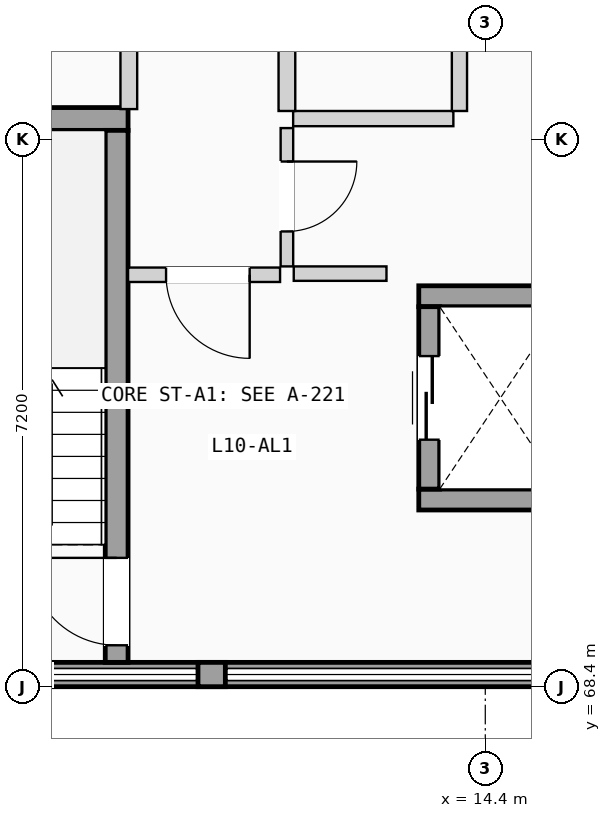
"""IFC4 building model, lengths in metres.
Left out: names, types, materials, properties, quantities, classifications, styles, units other than length and angle.
Written with IfcOpenShell. Run it as: python <this file> out.ifc"""

import sys

from ifc_helpers import new_model, si_unit, direction, frame, frame_2d, origin, place, context, subcontext, project, spatial, rectangle, extrude, element, fill, save


model = new_model("IFC4")
c1 = context("Model", 3, precision=1e-05, world=origin(), true_north=direction((0.0, 1.0)))
c2 = subcontext(c1, "Body", "Model", "MODEL_VIEW")
j1 = project(units=[si_unit("LENGTHUNIT", "METRE"), si_unit("PLANEANGLEUNIT", "RADIAN")], contexts=[c1])
p1 = place(None, origin())
s1 = spatial("IfcSite", under=j1, at=p1, CompositionType="ELEMENT")
p2 = place(p1, origin())
s2 = spatial("IfcBuilding", under=s1, at=p2, CompositionType="ELEMENT")
p3 = place(p2, frame((0.0, 0.0, 34.125)))
s3 = spatial("IfcBuildingStorey", under=s2, at=p3, CompositionType="ELEMENT", Elevation=34.125)
p4 = place(p3, frame((0.0, 68.56, 0.0), z_axis=(0.0, 0.0, 1.0), x_axis=(1.0, 0.0, 0.0)))
e1 = element("IfcWall", 1, at=p4, inside=s3, PredefinedType="SOLIDWALL", context=c2, shape_type="SweptSolid", body=[
    extrude(rectangle(XDim=21.6, YDim=0.32, at=frame_2d((10.8, 0.0))), origin(), (0.0, 0.0, 1.0), 1.11),
])
p5 = place(p3, frame((10.62, 68.56, 1.11), z_axis=(0.0, 0.0, 1.0), x_axis=(1.0, 0.0, 0.0)))
e2 = element("IfcWall", 2, at=p5, inside=s3, PredefinedType="SOLIDWALL", context=c2, shape_type="SweptSolid", body=[
    extrude(rectangle(XDim=0.36, YDim=0.32, at=frame_2d((0.18, 0.0))), origin(), (0.0, 0.0, 1.0), 1.78),
])
p6 = place(p3, frame((5.65, 75.87, 0.0), z_axis=(0.0, 0.0, 1.0), x_axis=(1.0, 0.0, 0.0)))
e3 = element("IfcWall", 3, at=p6, inside=s3, PredefinedType="SHEAR", context=c2, shape_type="SweptSolid", body=[
    extrude(rectangle(XDim=4.05, YDim=0.3, at=frame_2d((2.025, 0.0))), origin(), (0.0, 0.0, 1.0), 2.89),
])
p7 = place(p3, frame((9.55, 68.72, 0.0), z_axis=(0.0, 0.0, 1.0), x_axis=(0.0, 1.0, 0.0)))
e4 = element("IfcWall", 4, at=p7, inside=s3, PredefinedType="SHEAR", context=c2, shape_type="SweptSolid", body=[
    extrude(rectangle(XDim=7.0, YDim=0.3, at=frame_2d((3.5, 0.0))), origin(), (0.0, 0.0, 1.0), 2.89),
])
p8 = place(p7, frame((0.225, 0.0, 0.0)))
e5 = element("IfcOpeningElement", 5, at=p8, cuts=e4, PredefinedType="OPENING", context=c2, shape_type="SweptSolid", body=[
    extrude(rectangle(XDim=1.15, YDim=2.12, at=frame_2d((0.575, 1.06))), frame((0.0, 0.16, 0.0), z_axis=(0.0, -1.0, 0.0), x_axis=(1.0, 0.0, 0.0)), (0.0, 0.0, 1.0), 0.32),
])
for number, where, z_axis, x_axis in (
    (6, (13.525, 70.863, 0.0), (0.0, 0.0, 1.0), (1.0, 0.0, 0.0)),
    (7, (13.525, 73.538, 0.0), (0.0, 0.0, 1.0), (1.0, 0.0, 0.0)),
):
    element("IfcWall", number, at=place(p3, frame(where, z_axis=z_axis, x_axis=x_axis)), inside=s3, PredefinedType="SHEAR", context=c2, shape_type="SweptSolid", body=[
        extrude(rectangle(XDim=2.15, YDim=0.275, at=frame_2d((1.075, 0.0))), origin(), (0.0, 0.0, 1.0), 2.89),
    ])
p9 = place(p3, frame((13.663, 71.0, 0.0), z_axis=(0.0, 0.0, 1.0), x_axis=(0.0, 1.0, 0.0)))
e8 = element("IfcWall", 8, at=p9, inside=s3, PredefinedType="SHEAR", context=c2, shape_type="SweptSolid", body=[
    extrude(rectangle(XDim=2.4, YDim=0.275, at=frame_2d((1.2, 0.0))), origin(), (0.0, 0.0, 1.0), 2.89),
])
p10 = place(p9, frame((0.65, 0.0, 0.0)))
e9 = element("IfcOpeningElement", 9, at=p10, cuts=e8, PredefinedType="OPENING", context=c2, shape_type="SweptSolid", body=[
    extrude(rectangle(XDim=1.1, YDim=2.15, at=frame_2d((0.55, 1.075))), frame((0.0, 0.147, 0.0), z_axis=(0.0, -1.0, 0.0), x_axis=(1.0, 0.0, 0.0)), (0.0, 0.0, 1.0), 0.295),
])
p11 = place(p3, frame((11.88, 73.835, 0.0), z_axis=(0.0, 0.0, 1.0), x_axis=(1.0, 0.0, 0.0)))
e10 = element("IfcWall", 10, at=p11, inside=s3, PredefinedType="PARTITIONING", context=c2, shape_type="SweptSolid", body=[
    extrude(rectangle(XDim=1.22, YDim=0.19, at=frame_2d((0.61, 0.0))), origin(), (0.0, 0.0, 1.0), 2.87),
])
p12 = place(p3, frame((9.7, 73.82, 0.0), z_axis=(0.0, 0.0, 1.0), x_axis=(1.0, 0.0, 0.0)))
e11 = element("IfcWall", 11, at=p12, inside=s3, PredefinedType="PARTITIONING", context=c2, shape_type="SweptSolid", body=[
    extrude(rectangle(XDim=2.0, YDim=0.19, at=frame_2d((1.0, 0.0))), origin(), (0.0, 0.0, 1.0), 2.87),
])
p13 = place(p12, frame((0.5, 0.0, 0.0)))
e12 = element("IfcOpeningElement", 12, at=p13, cuts=e11, PredefinedType="OPENING", context=c2, shape_type="SweptSolid", body=[
    extrude(rectangle(XDim=1.1, YDim=2.12, at=frame_2d((0.55, 1.06))), frame((0.0, 0.105, 0.0), z_axis=(0.0, -1.0, 0.0), x_axis=(1.0, 0.0, 0.0)), (0.0, 0.0, 1.0), 0.21),
])
p14 = place(p3, frame((11.79, 73.93, 0.0), z_axis=(0.0, 0.0, 1.0), x_axis=(0.0, 1.0, 0.0)))
e13 = element("IfcWall", 13, at=p14, inside=s3, PredefinedType="PARTITIONING", context=c2, shape_type="SweptSolid", body=[
    extrude(rectangle(XDim=1.82, YDim=0.165, at=frame_2d((0.91, 0.0))), origin(), (0.0, 0.0, 1.0), 2.87),
])
p15 = place(p14, frame((0.46, 0.0, 0.0)))
e14 = element("IfcOpeningElement", 14, at=p15, cuts=e13, PredefinedType="OPENING", context=c2, shape_type="SweptSolid", body=[
    extrude(rectangle(XDim=0.92, YDim=2.04, at=frame_2d((0.46, 1.02))), frame((0.0, 0.093, 0.0), z_axis=(0.0, -1.0, 0.0), x_axis=(1.0, 0.0, 0.0)), (0.0, 0.0, 1.0), 0.185),
])
p16 = place(p3, frame((11.872, 75.875, 0.0), z_axis=(0.0, 0.0, 1.0), x_axis=(1.0, 0.0, 0.0)))
e15 = element("IfcWall", 15, at=p16, inside=s3, PredefinedType="PLUMBINGWALL", context=c2, shape_type="SweptSolid", body=[
    extrude(rectangle(XDim=2.108, YDim=0.2, at=frame_2d((1.054, 0.0))), origin(), (0.0, 0.0, 1.0), 2.87),
])
p17 = place(p3, frame((9.71, 76.0, 0.0), z_axis=(0.0, 0.0, 1.0), x_axis=(0.0, 1.0, 0.0)))
e16 = element("IfcWall", 16, at=p17, inside=s3, PredefinedType="PLUMBINGWALL", context=c2, shape_type="SweptSolid", body=[
    extrude(rectangle(XDim=7.67, YDim=0.22, at=frame_2d((3.835, 0.0))), origin(), (0.0, 0.0, 1.0), 2.87),
])
p18 = place(p3, frame((11.79, 75.975, 0.0), z_axis=(0.0, 0.0, 1.0), x_axis=(0.0, 1.0, 0.0)))
e17 = element("IfcWall", 17, at=p18, inside=s3, PredefinedType="PLUMBINGWALL", context=c2, shape_type="SweptSolid", body=[
    extrude(rectangle(XDim=7.695, YDim=0.22, at=frame_2d((3.847, 0.0))), origin(), (0.0, 0.0, 1.0), 2.87),
])
p19 = place(p3, frame((14.06, 75.975, 0.0), z_axis=(0.0, 0.0, 1.0), x_axis=(0.0, 1.0, 0.0)))
e18 = element("IfcWall", 18, at=p19, inside=s3, PredefinedType="PLUMBINGWALL", context=c2, shape_type="SweptSolid", body=[
    extrude(rectangle(XDim=7.715, YDim=0.2, at=frame_2d((3.857, 0.0))), origin(), (0.0, 0.0, 1.0), 2.87),
])
p20 = place(p19, frame((3.435, 0.0, 0.0)))
e19 = element("IfcOpeningElement", 19, at=p20, cuts=e18, PredefinedType="OPENING", context=c2, shape_type="SweptSolid", body=[
    extrude(rectangle(XDim=0.85, YDim=2.01, at=frame_2d((0.425, 1.005))), frame((0.0, 0.11, 0.0), z_axis=(0.0, -1.0, 0.0), x_axis=(1.0, 0.0, 0.0)), (0.0, 0.0, 1.0), 0.22),
])
p21 = place(p8, origin())
e20 = element("IfcDoor", 20, at=p21, inside=s3, OperationType="SINGLE_SWING_RIGHT", PredefinedType="DOOR", context=c2, shape_type="SweptSolid", body=[
    extrude(rectangle(XDim=1.15, YDim=2.12, at=frame_2d((0.575, 1.06))), frame((0.0, 0.025, 0.0), z_axis=(0.0, -1.0, 0.0), x_axis=(1.0, 0.0, 0.0)), (0.0, 0.0, 1.0), 0.05),
])
fill(e5, e20)
p22 = place(p10, origin())
e21 = element("IfcDoor", 21, at=p22, inside=s3, OperationType="SLIDING_TO_LEFT", PredefinedType="DOOR", context=c2, shape_type="SweptSolid", body=[
    extrude(rectangle(XDim=1.1, YDim=2.15, at=frame_2d((0.55, 1.075))), frame((0.0, 0.025, 0.0), z_axis=(0.0, -1.0, 0.0), x_axis=(1.0, 0.0, 0.0)), (0.0, 0.0, 1.0), 0.05),
])
fill(e9, e21)
p23 = place(p13, frame((1.1, 0.0, 0.0), z_axis=(0.0, 0.0, 1.0), x_axis=(-1.0, 0.0, 0.0)))
e22 = element("IfcDoor", 22, at=p23, inside=s3, OperationType="SINGLE_SWING_RIGHT", PredefinedType="DOOR", context=c2, shape_type="SweptSolid", body=[
    extrude(rectangle(XDim=1.1, YDim=2.12, at=frame_2d((0.55, 1.06))), frame((0.0, 0.025, 0.0), z_axis=(0.0, -1.0, 0.0), x_axis=(1.0, 0.0, 0.0)), (0.0, 0.0, 1.0), 0.05),
])
fill(e12, e22)
p24 = place(p15, frame((0.92, 0.0, 0.0), z_axis=(0.0, 0.0, 1.0), x_axis=(-1.0, 0.0, 0.0)))
e23 = element("IfcDoor", 23, at=p24, inside=s3, OperationType="SINGLE_SWING_RIGHT", PredefinedType="DOOR", context=c2, shape_type="SweptSolid", body=[
    extrude(rectangle(XDim=0.92, YDim=2.04, at=frame_2d((0.46, 1.02))), frame((0.0, 0.025, 0.0), z_axis=(0.0, -1.0, 0.0), x_axis=(1.0, 0.0, 0.0)), (0.0, 0.0, 1.0), 0.05),
])
fill(e14, e23)
save(model, sys.argv[1])
